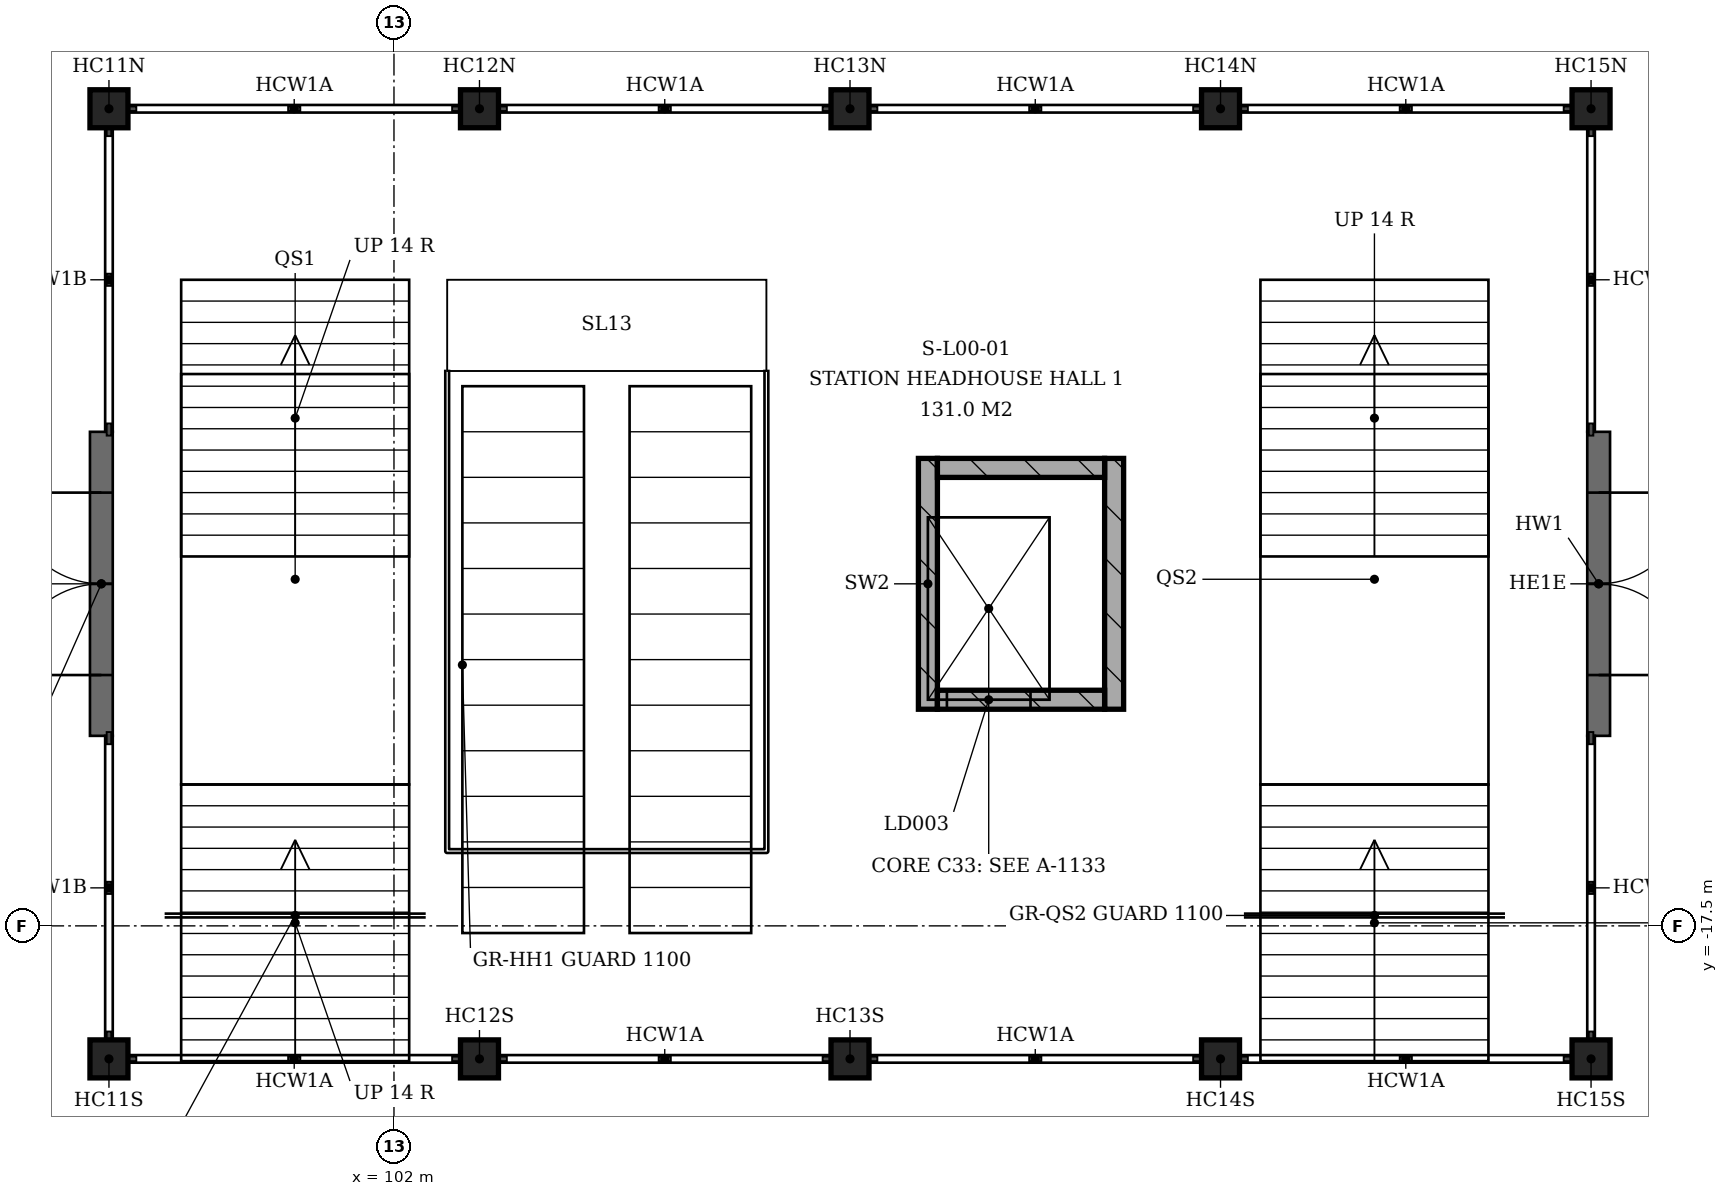
"""IFC4 building model, lengths in metres.
Left out: names, types, materials, properties, quantities, classifications, styles, units other than length and angle.
Written with IfcOpenShell. Run it as: python <this file> out.ifc"""

import sys

from ifc_helpers import new_model, si_unit, direction, frame, frame_2d, origin, origin_2d, place, context, subcontext, project, spatial, rectangle, extrude, element, fill, save


model = new_model("IFC4")
c1 = context("Model", 3, precision=1e-05, world=origin(), true_north=direction((0.0, 1.0)))
c2 = subcontext(c1, "Body", "Model", "MODEL_VIEW")
j1 = project(units=[si_unit("LENGTHUNIT", "METRE"), si_unit("PLANEANGLEUNIT", "RADIAN")], contexts=[c1])
p1 = place(None, origin())
s1 = spatial("IfcSite", under=j1, at=p1, CompositionType="ELEMENT")
p2 = place(p1, origin())
s2 = spatial("IfcBuilding", under=s1, at=p2, CompositionType="ELEMENT")
p3 = place(p2, origin())
s3 = spatial("IfcBuildingStorey", under=s2, at=p3, CompositionType="ELEMENT", Elevation=0.0)
for number, where, z_axis, x_axis in (
    (1, (109.025, -14.65, 0.0), (0.0, 0.0, 1.0), (0.0, 1.0, 0.0)),
    (2, (111.475, -14.65, 0.0), (0.0, 0.0, 1.0), (0.0, 1.0, 0.0)),
):
    element("IfcWall", number, at=place(p3, frame(where, z_axis=z_axis, x_axis=x_axis)), inside=s3, PredefinedType="SHEAR", context=c2, shape_type="SweptSolid", body=[
        extrude(rectangle(XDim=3.3, YDim=0.25, at=frame_2d((1.65, 0.0))), origin(), (0.0, 0.0, 1.0), 5.5),
    ])
p4 = place(p3, frame((109.15, -14.525, 0.0), z_axis=(0.0, 0.0, 1.0), x_axis=(1.0, 0.0, 0.0)))
e3 = element("IfcWall", 3, at=p4, inside=s3, PredefinedType="SHEAR", context=c2, shape_type="SweptSolid", body=[
    extrude(rectangle(XDim=2.2, YDim=0.25, at=frame_2d((1.1, 0.0))), origin(), (0.0, 0.0, 1.0), 5.5),
])
p5 = place(p4, frame((0.125, 0.0, 0.0)))
e4 = element("IfcOpeningElement", 4, at=p5, cuts=e3, PredefinedType="OPENING", context=c2, shape_type="SweptSolid", body=[
    extrude(rectangle(XDim=1.1, YDim=2.1, at=frame_2d((0.55, 1.05))), frame((0.0, 0.125, 0.0), z_axis=(0.0, -1.0, 0.0), x_axis=(1.0, 0.0, 0.0)), (0.0, 0.0, 1.0), 0.25),
])
p6 = place(p3, frame((109.15, -11.475, 0.0), z_axis=(0.0, 0.0, 1.0), x_axis=(1.0, 0.0, 0.0)))
e5 = element("IfcWall", 5, at=p6, inside=s3, PredefinedType="SHEAR", context=c2, shape_type="SweptSolid", body=[
    extrude(rectangle(XDim=2.2, YDim=0.25, at=frame_2d((1.1, 0.0))), origin(), (0.0, 0.0, 1.0), 5.5),
])
for number, where, z_axis, x_axis in (
    (6, (98.25, -19.25, 0.0), (0.0, 0.0, 1.0), (1.0, 0.0, 0.0)),
    (7, (98.25, -6.75, 0.0), (0.0, 0.0, 1.0), (1.0, 0.0, 0.0)),
    (8, (103.125, -19.25, 0.0), (0.0, 0.0, 1.0), (1.0, 0.0, 0.0)),
    (9, (103.125, -6.75, 0.0), (0.0, 0.0, 1.0), (1.0, 0.0, 0.0)),
    (10, (108.0, -19.25, 0.0), (0.0, 0.0, 1.0), (1.0, 0.0, 0.0)),
    (11, (108.0, -6.75, 0.0), (0.0, 0.0, 1.0), (1.0, 0.0, 0.0)),
    (12, (112.875, -19.25, 0.0), (0.0, 0.0, 1.0), (1.0, 0.0, 0.0)),
    (13, (112.875, -6.75, 0.0), (0.0, 0.0, 1.0), (1.0, 0.0, 0.0)),
    (14, (117.75, -19.25, 0.0), (0.0, 0.0, 1.0), (1.0, 0.0, 0.0)),
    (15, (117.75, -6.75, 0.0), (0.0, 0.0, 1.0), (1.0, 0.0, 0.0)),
):
    element("IfcColumn", number, at=place(p3, frame(where, z_axis=z_axis, x_axis=x_axis)), inside=s3, PredefinedType="COLUMN", context=c2, shape_type="SweptSolid", body=[
        extrude(rectangle(XDim=0.5, YDim=0.5, at=origin_2d()), origin(), (0.0, 0.0, 1.0), 5.5),
    ])
p7 = place(p3, frame((98.15, -15.0, 0.0), z_axis=(0.0, 0.0, 1.0), x_axis=(0.0, 1.0, 0.0)))
e16 = element("IfcWall", 16, at=p7, inside=s3, PredefinedType="SOLIDWALL", context=c2, shape_type="SweptSolid", body=[
    extrude(rectangle(XDim=4.0, YDim=0.3, at=frame_2d((2.0, 0.0))), origin(), (0.0, 0.0, 1.0), 4.8),
])
p8 = place(p7, frame((0.8, 0.0, 0.0)))
e17 = element("IfcOpeningElement", 17, at=p8, cuts=e16, PredefinedType="OPENING", context=c2, shape_type="SweptSolid", body=[
    extrude(rectangle(XDim=2.4, YDim=2.7, at=frame_2d((1.2, 1.35))), frame((0.0, 0.15, 0.0), z_axis=(0.0, -1.0, 0.0), x_axis=(1.0, 0.0, 0.0)), (0.0, 0.0, 1.0), 0.3),
])
p9 = place(p3, frame((117.85, -15.0, 0.0), z_axis=(0.0, 0.0, 1.0), x_axis=(0.0, 1.0, 0.0)))
e18 = element("IfcWall", 18, at=p9, inside=s3, PredefinedType="SOLIDWALL", context=c2, shape_type="SweptSolid", body=[
    extrude(rectangle(XDim=4.0, YDim=0.3, at=frame_2d((2.0, 0.0))), origin(), (0.0, 0.0, 1.0), 4.8),
])
p10 = place(p9, frame((0.8, 0.0, 0.0)))
e19 = element("IfcOpeningElement", 19, at=p10, cuts=e18, PredefinedType="OPENING", context=c2, shape_type="SweptSolid", body=[
    extrude(rectangle(XDim=2.4, YDim=2.7, at=frame_2d((1.2, 1.35))), frame((0.0, 0.15, 0.0), z_axis=(0.0, -1.0, 0.0), x_axis=(1.0, 0.0, 0.0)), (0.0, 0.0, 1.0), 0.3),
])
p11 = place(p5, origin())
e20 = element("IfcDoor", 20, at=p11, inside=s3, OperationType="SLIDING_TO_LEFT", PredefinedType="DOOR", context=c2, shape_type="SweptSolid", body=[
    extrude(rectangle(XDim=1.1, YDim=2.1, at=frame_2d((0.55, 1.05))), frame((0.0, 0.025, 0.0), z_axis=(0.0, -1.0, 0.0), x_axis=(1.0, 0.0, 0.0)), (0.0, 0.0, 1.0), 0.05),
])
fill(e4, e20)
p12 = place(p8, origin())
e21 = element("IfcDoor", 21, at=p12, inside=s3, OperationType="DOUBLE_DOOR_SINGLE_SWING", PredefinedType="DOOR", context=c2, shape_type="SweptSolid", body=[
    extrude(rectangle(XDim=2.4, YDim=2.7, at=frame_2d((1.2, 1.35))), frame((0.0, 0.025, 0.0), z_axis=(0.0, -1.0, 0.0), x_axis=(1.0, 0.0, 0.0)), (0.0, 0.0, 1.0), 0.05),
])
fill(e17, e21)
p13 = place(p10, frame((2.4, 0.0, 0.0), z_axis=(0.0, 0.0, 1.0), x_axis=(-1.0, 0.0, 0.0)))
e22 = element("IfcDoor", 22, at=p13, inside=s3, OperationType="DOUBLE_DOOR_SINGLE_SWING", PredefinedType="DOOR", context=c2, shape_type="SweptSolid", body=[
    extrude(rectangle(XDim=2.4, YDim=2.7, at=frame_2d((1.2, 1.35))), frame((0.0, 0.025, 0.0), z_axis=(0.0, -1.0, 0.0), x_axis=(1.0, 0.0, 0.0)), (0.0, 0.0, 1.0), 0.05),
])
fill(e19, e22)
save(model, sys.argv[1])
